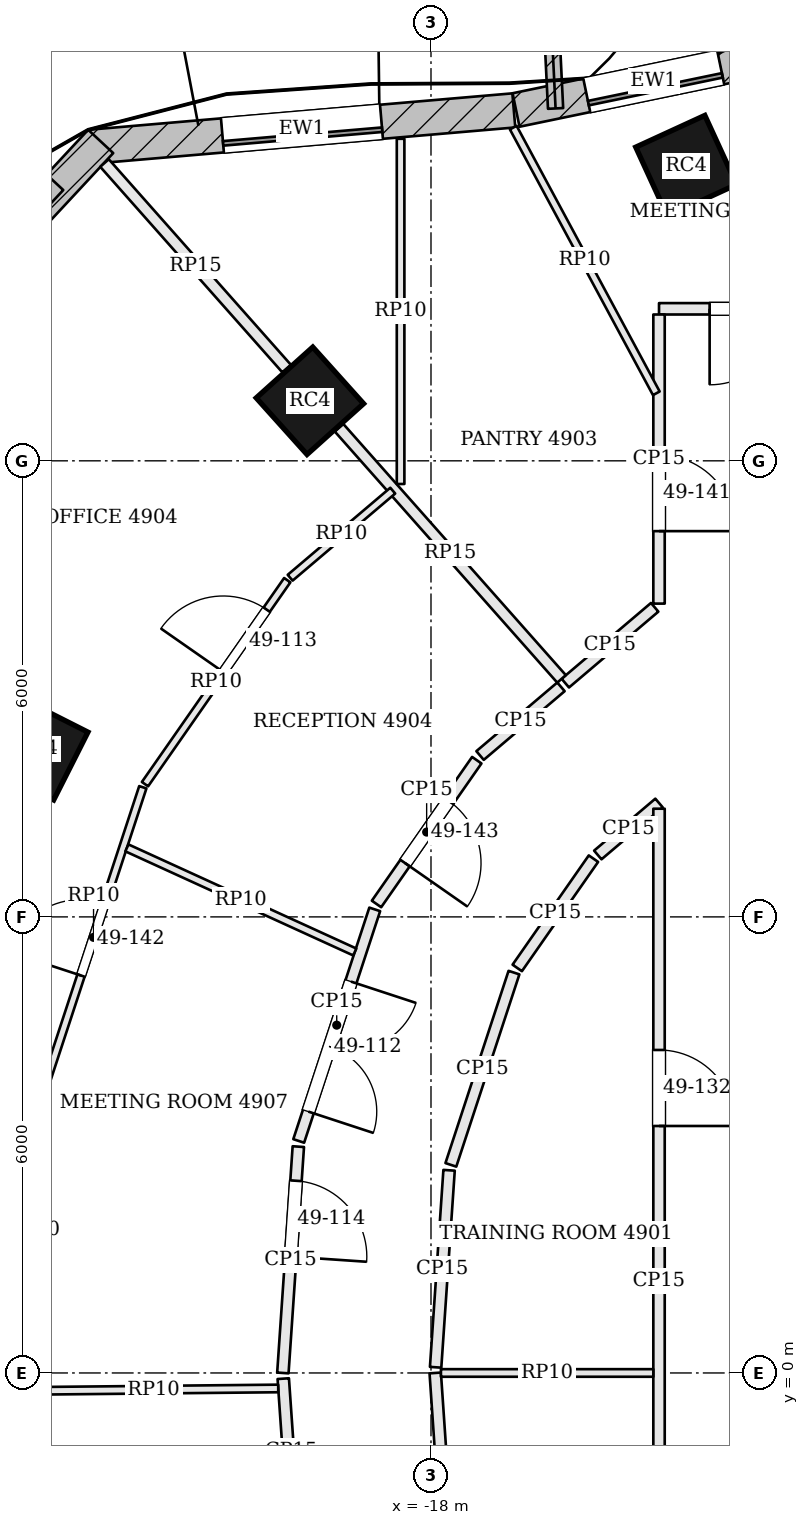
"""IFC4 building model, lengths in metres.
Left out: names, types, materials, properties, quantities, classifications, styles, units other than length and angle.
Written with IfcOpenShell. Run it as: python <this file> out.ifc"""

import sys

from ifc_helpers import new_model, si_unit, direction, frame, frame_2d, origin, origin_2d, place, context, subcontext, project, spatial, rectangle, extrude, element, fill, save


model = new_model("IFC4")
c1 = context("Model", 3, precision=1e-05, world=origin(), true_north=direction((0.0, 1.0)))
c2 = subcontext(c1, "Body", "Model", "MODEL_VIEW")
j1 = project(units=[si_unit("LENGTHUNIT", "METRE"), si_unit("PLANEANGLEUNIT", "RADIAN")], contexts=[c1])
p1 = place(None, origin())
s1 = spatial("IfcSite", under=j1, at=p1, CompositionType="ELEMENT")
p2 = place(p1, origin())
s2 = spatial("IfcBuilding", under=s1, at=p2, CompositionType="ELEMENT")
p3 = place(p2, frame((0.0, 0.0, 201.3)))
s3 = spatial("IfcBuildingStorey", under=s2, at=p3, CompositionType="ELEMENT", Elevation=201.3)
for number, where, z_axis, x_axis in (
    (1, (-14.643, 15.881, 0.0), (0.0, 0.0, 1.0), (-0.909, -0.417, 0.0)),
    (2, (-19.593, 12.79, 0.0), (0.0, 0.0, 1.0), (-0.744, -0.668, 0.0)),
    (3, (-23.185, 8.21, 0.0), (0.0, 0.0, 1.0), (-0.451, -0.893, 0.0)),
):
    element("IfcColumn", number, at=place(p3, frame(where, z_axis=z_axis, x_axis=x_axis)), inside=s3, PredefinedType="COLUMN", context=c2, shape_type="SweptSolid", body=[
        extrude(rectangle(XDim=1.0, YDim=1.0, at=origin_2d()), origin(), (0.0, 0.0, 1.0), 3.9),
    ])
p4 = place(p3, frame((-13.258, 17.367, 0.0), z_axis=(0.0, 0.0, 1.0), x_axis=(-0.97914968674, -0.203140077183, 0.0)))
e4 = element("IfcWall", 4, at=p4, inside=s3, PredefinedType="SOLIDWALL", context=c2, shape_type="SweptSolid", body=[
    extrude(rectangle(XDim=3.7, YDim=0.45, at=frame_2d((1.85, 0.0))), origin(), (0.0, 0.0, 1.0), 3.7),
])
p5 = place(p4, frame((0.95, 0.0, 0.9)))
e5 = element("IfcOpeningElement", 5, at=p5, cuts=e4, PredefinedType="OPENING", context=c2, shape_type="SweptSolid", body=[
    extrude(rectangle(XDim=1.8, YDim=2.3, at=frame_2d((0.9, 1.15))), frame((0.0, 0.235, 0.0), z_axis=(0.0, -1.0, 0.0), x_axis=(1.0, 0.0, 0.0)), (0.0, 0.0, 1.0), 0.47),
])
p6 = place(p3, frame((-16.91, 16.61, 0.0), z_axis=(0.0, 0.0, 1.0), x_axis=(-0.996333165816, -0.085558299972, 0.0)))
e6 = element("IfcWall", 6, at=p6, inside=s3, PredefinedType="SOLIDWALL", context=c2, shape_type="SweptSolid", body=[
    extrude(rectangle(XDim=5.596, YDim=0.45, at=frame_2d((2.798, 0.0))), origin(), (0.0, 0.0, 1.0), 3.7),
])
p7 = place(p6, frame((1.748, 0.0, 0.9)))
e7 = element("IfcOpeningElement", 7, at=p7, cuts=e6, PredefinedType="OPENING", context=c2, shape_type="SweptSolid", body=[
    extrude(rectangle(XDim=2.1, YDim=2.3, at=frame_2d((1.05, 1.15))), frame((0.0, 0.235, 0.0), z_axis=(0.0, -1.0, 0.0), x_axis=(1.0, 0.0, 0.0)), (0.0, 0.0, 1.0), 0.47),
])
p8 = place(p3, frame((-22.345, 16.202, 0.0), z_axis=(0.0, 0.0, 1.0), x_axis=(-0.681249161265, -0.732051624051, 0.0)))
e8 = element("IfcWall", 8, at=p8, inside=s3, PredefinedType="SOLIDWALL", context=c2, shape_type="SweptSolid", body=[
    extrude(rectangle(XDim=4.527, YDim=0.45, at=frame_2d((2.263, 0.0))), origin(), (0.0, 0.0, 1.0), 3.7),
])
p9 = place(p8, frame((1.213, 0.0, 0.9)))
e9 = element("IfcOpeningElement", 9, at=p9, cuts=e8, PredefinedType="OPENING", context=c2, shape_type="SweptSolid", body=[
    extrude(rectangle(XDim=2.1, YDim=2.3, at=frame_2d((1.05, 1.15))), frame((0.0, 0.235, 0.0), z_axis=(0.0, -1.0, 0.0), x_axis=(1.0, 0.0, 0.0)), (0.0, 0.0, 1.0), 0.47),
])
p10 = place(p3, frame((-16.361, 16.636, 0.0), z_axis=(0.0, 0.0, 1.0), x_axis=(-0.048552811097, 0.998820616795, 0.0)))
e10 = element("IfcWall", 10, at=p10, inside=s3, PredefinedType="SOLIDWALL", context=c2, shape_type="SweptSolid", body=[
    extrude(rectangle(XDim=1.75, YDim=0.2, at=frame_2d((0.875, 0.0))), origin(), (0.0, 0.0, 1.0), 3.7),
])
p11 = place(p3, frame((-22.948, 15.665, 3.9), z_axis=(0.0, 0.0, 1.0), x_axis=(-0.681269800001, -0.732032417046, 0.0)))
e11 = element("IfcWall", 11, at=p11, inside=s3, PredefinedType="PARAPET", context=c2, shape_type="SweptSolid", body=[
    extrude(rectangle(XDim=3.578, YDim=0.3, at=frame_2d((1.789, 0.0))), origin(), (0.0, 0.0, 1.0), 1.1),
])
p12 = place(p3, frame((-3.313, 14.0, 0.0), z_axis=(0.0, 0.0, 1.0), x_axis=(-1.0, 0.0, 0.0)))
e12 = element("IfcWall", 12, at=p12, inside=s3, PredefinedType="PARTITIONING", context=c2, shape_type="SweptSolid", body=[
    extrude(rectangle(XDim=11.687, YDim=0.15, at=frame_2d((5.843, 0.0))), origin(), (0.0, 0.0, 1.0), 3.084),
])
p13 = place(p12, frame((1.77, 0.0, 0.0)))
e13 = element("IfcOpeningElement", 13, at=p13, cuts=e12, PredefinedType="OPENING", context=c2, shape_type="SweptSolid", body=[
    extrude(rectangle(XDim=1.8, YDim=2.1, at=frame_2d((0.9, 1.05))), frame((0.0, 0.085, 0.0), z_axis=(0.0, -1.0, 0.0), x_axis=(1.0, 0.0, 0.0)), (0.0, 0.0, 1.0), 0.17),
])
p14 = place(p12, frame((6.297, 0.0, 0.0)))
e14 = element("IfcOpeningElement", 14, at=p14, cuts=e12, PredefinedType="OPENING", context=c2, shape_type="SweptSolid", body=[
    extrude(rectangle(XDim=1.0, YDim=2.4, at=frame_2d((0.5, 1.2))), frame((0.0, 0.085, 0.0), z_axis=(0.0, -1.0, 0.0), x_axis=(1.0, 0.0, 0.0)), (0.0, 0.0, 1.0), 0.17),
])
p15 = place(p12, frame((10.021, 0.0, 0.0)))
e15 = element("IfcOpeningElement", 15, at=p15, cuts=e12, PredefinedType="OPENING", context=c2, shape_type="SweptSolid", body=[
    extrude(rectangle(XDim=1.0, YDim=2.4, at=frame_2d((0.5, 1.2))), frame((0.0, 0.085, 0.0), z_axis=(0.0, -1.0, 0.0), x_axis=(1.0, 0.0, 0.0)), (0.0, 0.0, 1.0), 0.17),
])
p16 = place(p3, frame((-15.0, 13.925, 0.0), z_axis=(0.0, 0.0, 1.0), x_axis=(0.0, -1.0, 0.0)))
e16 = element("IfcWall", 16, at=p16, inside=s3, PredefinedType="PARTITIONING", context=c2, shape_type="SweptSolid", body=[
    extrude(rectangle(XDim=3.803, YDim=0.15, at=frame_2d((1.902, 0.0))), origin(), (0.0, 0.0, 1.0), 3.084),
])
p17 = place(p16, frame((1.85, 0.0, 0.0)))
e17 = element("IfcOpeningElement", 17, at=p17, cuts=e16, PredefinedType="OPENING", context=c2, shape_type="SweptSolid", body=[
    extrude(rectangle(XDim=1.0, YDim=2.1, at=frame_2d((0.5, 1.05))), frame((0.0, 0.085, 0.0), z_axis=(0.0, -1.0, 0.0), x_axis=(1.0, 0.0, 0.0)), (0.0, 0.0, 1.0), 0.17),
])
p18 = place(p3, frame((-15.057, 10.073, 0.0), z_axis=(0.0, 0.0, 1.0), x_axis=(-0.762454697996, -0.647041601061, 0.0)))
e18 = element("IfcWall", 18, at=p18, inside=s3, PredefinedType="PARTITIONING", context=c2, shape_type="SweptSolid", body=[
    extrude(rectangle(XDim=1.542, YDim=0.15, at=frame_2d((0.771, 0.0))), origin(), (0.0, 0.0, 1.0), 3.084),
])
p19 = place(p3, frame((-22.295, 15.918, 0.0), z_axis=(0.0, 0.0, 1.0), x_axis=(0.663108813626, -0.748523013201, 0.0)))
e19 = element("IfcWall", 19, at=p19, inside=s3, PredefinedType="PARTITIONING", context=c2, shape_type="SweptSolid", body=[
    extrude(rectangle(XDim=3.613, YDim=0.15, at=frame_2d((1.806, 0.0))), origin(), (0.0, 0.0, 1.0), 3.084),
])
p20 = place(p3, frame((-19.21, 12.435, 0.0), z_axis=(0.0, 0.0, 1.0), x_axis=(0.663120249496, -0.748512882125, 0.0)))
e20 = element("IfcWall", 20, at=p20, inside=s3, PredefinedType="PARTITIONING", context=c2, shape_type="SweptSolid", body=[
    extrude(rectangle(XDim=4.414, YDim=0.15, at=frame_2d((2.207, 0.0))), origin(), (0.0, 0.0, 1.0), 3.084),
])
p21 = place(p3, frame((-16.29, 9.027, 0.0), z_axis=(0.0, 0.0, 1.0), x_axis=(-0.762370577706, -0.647140712865, 0.0)))
e21 = element("IfcWall", 21, at=p21, inside=s3, PredefinedType="PARTITIONING", context=c2, shape_type="SweptSolid", body=[
    extrude(rectangle(XDim=1.396, YDim=0.15, at=frame_2d((0.698, 0.0))), origin(), (0.0, 0.0, 1.0), 3.084),
])
p22 = place(p3, frame((-17.397, 8.062, 0.0), z_axis=(0.0, 0.0, 1.0), x_axis=(-0.572118665737, -0.820170855563, 0.0)))
e22 = element("IfcWall", 22, at=p22, inside=s3, PredefinedType="PARTITIONING", context=c2, shape_type="SweptSolid", body=[
    extrude(rectangle(XDim=2.306, YDim=0.15, at=frame_2d((1.153, 0.0))), origin(), (0.0, 0.0, 1.0), 3.084),
])
p23 = place(p22, frame((0.65, 0.0, 0.0)))
e23 = element("IfcOpeningElement", 23, at=p23, cuts=e22, PredefinedType="OPENING", context=c2, shape_type="SweptSolid", body=[
    extrude(rectangle(XDim=1.0, YDim=2.1, at=frame_2d((0.5, 1.05))), frame((0.0, 0.085, 0.0), z_axis=(0.0, -1.0, 0.0), x_axis=(1.0, 0.0, 0.0)), (0.0, 0.0, 1.0), 0.17),
])
p24 = place(p3, frame((-18.74, 6.099, 0.0), z_axis=(0.0, 0.0, 1.0), x_axis=(-0.31188427026, -0.950120098706, 0.0)))
e24 = element("IfcWall", 24, at=p24, inside=s3, PredefinedType="PARTITIONING", context=c2, shape_type="SweptSolid", body=[
    extrude(rectangle(XDim=3.206, YDim=0.15, at=frame_2d((1.603, 0.0))), origin(), (0.0, 0.0, 1.0), 3.084),
])
p25 = place(p24, frame((1.0, 0.0, 0.0)))
e25 = element("IfcOpeningElement", 25, at=p25, cuts=e24, PredefinedType="OPENING", context=c2, shape_type="SweptSolid", body=[
    extrude(rectangle(XDim=1.8, YDim=2.1, at=frame_2d((0.9, 1.05))), frame((0.0, 0.085, 0.0), z_axis=(0.0, -1.0, 0.0), x_axis=(1.0, 0.0, 0.0)), (0.0, 0.0, 1.0), 0.17),
])
p26 = place(p3, frame((-19.745, 2.978, 0.0), z_axis=(0.0, 0.0, 1.0), x_axis=(-0.068142324, -0.997675610447, 0.0)))
e26 = element("IfcWall", 26, at=p26, inside=s3, PredefinedType="PARTITIONING", context=c2, shape_type="SweptSolid", body=[
    extrude(rectangle(XDim=2.984, YDim=0.15, at=frame_2d((1.492, 0.0))), origin(), (0.0, 0.0, 1.0), 3.084),
])
p27 = place(p26, frame((0.45, 0.0, 0.0)))
e27 = element("IfcOpeningElement", 27, at=p27, cuts=e26, PredefinedType="OPENING", context=c2, shape_type="SweptSolid", body=[
    extrude(rectangle(XDim=1.0, YDim=2.4, at=frame_2d((0.5, 1.2))), frame((0.0, 0.085, 0.0), z_axis=(0.0, -1.0, 0.0), x_axis=(1.0, 0.0, 0.0)), (0.0, 0.0, 1.0), 0.17),
])
p28 = place(p3, frame((-19.944, -0.075, 0.0), z_axis=(0.0, 0.0, 1.0), x_axis=(0.069483400546, -0.99758310784, 0.0)))
e28 = element("IfcWall", 28, at=p28, inside=s3, PredefinedType="PARTITIONING", context=c2, shape_type="SweptSolid", body=[
    extrude(rectangle(XDim=3.001, YDim=0.15, at=frame_2d((1.5, 0.0))), origin(), (0.0, 0.0, 1.0), 3.084),
])
p29 = place(p28, frame((1.05, 0.0, 0.0)))
e29 = element("IfcOpeningElement", 29, at=p29, cuts=e28, PredefinedType="OPENING", context=c2, shape_type="SweptSolid", body=[
    extrude(rectangle(XDim=0.9, YDim=2.1, at=frame_2d((0.45, 1.05))), frame((0.0, 0.085, 0.0), z_axis=(0.0, -1.0, 0.0), x_axis=(1.0, 0.0, 0.0)), (0.0, 0.0, 1.0), 0.17),
])
p30 = place(p3, frame((-17.767, -2.592, 0.0), z_axis=(0.0, 0.0, 1.0), x_axis=(-0.068140828228, 0.997675712608, 0.0)))
e30 = element("IfcWall", 30, at=p30, inside=s3, PredefinedType="PARTITIONING", context=c2, shape_type="SweptSolid", body=[
    extrude(rectangle(XDim=2.598, YDim=0.15, at=frame_2d((1.299, 0.0))), origin(), (0.0, 0.0, 1.0), 3.084),
])
p31 = place(p3, frame((-17.939, 0.075, 0.0), z_axis=(0.0, 0.0, 1.0), x_axis=(0.068227980697, 0.997669756307, 0.0)))
e31 = element("IfcWall", 31, at=p31, inside=s3, PredefinedType="PARTITIONING", context=c2, shape_type="SweptSolid", body=[
    extrude(rectangle(XDim=2.598, YDim=0.15, at=frame_2d((1.299, 0.0))), origin(), (0.0, 0.0, 1.0), 3.084),
])
p32 = place(p3, frame((-17.739, 2.738, 0.0), z_axis=(0.0, 0.0, 1.0), x_axis=(0.311904957484, 0.950113307715, 0.0)))
e32 = element("IfcWall", 32, at=p32, inside=s3, PredefinedType="PARTITIONING", context=c2, shape_type="SweptSolid", body=[
    extrude(rectangle(XDim=2.662, YDim=0.15, at=frame_2d((1.331, 0.0))), origin(), (0.0, 0.0, 1.0), 3.084),
])
p33 = place(p3, frame((-16.865, 5.329, 0.0), z_axis=(0.0, 0.0, 1.0), x_axis=(0.572096615639, 0.820186236397, 0.0)))
e33 = element("IfcWall", 33, at=p33, inside=s3, PredefinedType="PARTITIONING", context=c2, shape_type="SweptSolid", body=[
    extrude(rectangle(XDim=1.753, YDim=0.15, at=frame_2d((0.876, 0.0))), origin(), (0.0, 0.0, 1.0), 3.084),
])
p34 = place(p3, frame((-15.805, 6.814, 0.0), z_axis=(0.0, 0.0, 1.0), x_axis=(0.762298381233, 0.647225755027, 0.0)))
e34 = element("IfcWall", 34, at=p34, inside=s3, PredefinedType="PARTITIONING", context=c2, shape_type="SweptSolid", body=[
    extrude(rectangle(XDim=1.057, YDim=0.15, at=frame_2d((0.528, 0.0))), origin(), (0.0, 0.0, 1.0), 3.084),
])
p35 = place(p3, frame((-15.0, 7.423, 0.0), z_axis=(0.0, 0.0, 1.0), x_axis=(0.0, -1.0, 0.0)))
e35 = element("IfcWall", 35, at=p35, inside=s3, PredefinedType="PARTITIONING", context=c2, shape_type="SweptSolid", body=[
    extrude(rectangle(XDim=12.423, YDim=0.15, at=frame_2d((6.211, 0.0))), origin(), (0.0, 0.0, 1.0), 3.084),
])
p36 = place(p35, frame((3.174, 0.0, 0.0)))
e36 = element("IfcOpeningElement", 36, at=p36, cuts=e35, PredefinedType="OPENING", context=c2, shape_type="SweptSolid", body=[
    extrude(rectangle(XDim=1.0, YDim=2.1, at=frame_2d((0.5, 1.05))), frame((0.0, 0.085, 0.0), z_axis=(0.0, -1.0, 0.0), x_axis=(1.0, 0.0, 0.0)), (0.0, 0.0, 1.0), 0.17),
])
p37 = place(p3, frame((-18.4, 11.695, 0.0), z_axis=(0.0, 0.0, 1.0), x_axis=(0.0, 1.0, 0.0)))
e37 = element("IfcWall", 37, at=p37, inside=s3, PredefinedType="PARTITIONING", context=c2, shape_type="SweptSolid", body=[
    extrude(rectangle(XDim=4.541, YDim=0.1, at=frame_2d((2.271, 0.0))), origin(), (0.0, 0.0, 1.0), 3.084),
])
p38 = place(p3, frame((-15.036, 12.888, 0.0), z_axis=(0.0, 0.0, 1.0), x_axis=(-0.474066818375, 0.880488870864, 0.0)))
e38 = element("IfcWall", 38, at=p38, inside=s3, PredefinedType="PARTITIONING", context=c2, shape_type="SweptSolid", body=[
    extrude(rectangle(XDim=3.97, YDim=0.1, at=frame_2d((1.985, 0.0))), origin(), (0.0, 0.0, 1.0), 3.084),
])
p39 = place(p3, frame((-23.088, 3.756, 0.0), z_axis=(0.0, 0.0, 1.0), x_axis=(0.311942747624, 0.950100901065, 0.0)))
e39 = element("IfcWall", 39, at=p39, inside=s3, PredefinedType="PARTITIONING", context=c2, shape_type="SweptSolid", body=[
    extrude(rectangle(XDim=4.157, YDim=0.1, at=frame_2d((2.078, 0.0))), origin(), (0.0, 0.0, 1.0), 3.084),
])
p40 = place(p39, frame((1.55, 0.0, 0.0)))
e40 = element("IfcOpeningElement", 40, at=p40, cuts=e39, PredefinedType="OPENING", context=c2, shape_type="SweptSolid", body=[
    extrude(rectangle(XDim=1.0, YDim=2.4, at=frame_2d((0.5, 1.2))), frame((0.0, 0.06, 0.0), z_axis=(0.0, -1.0, 0.0), x_axis=(1.0, 0.0, 0.0)), (0.0, 0.0, 1.0), 0.12),
])
p41 = place(p3, frame((-21.763, 7.746, 0.0), z_axis=(0.0, 0.0, 1.0), x_axis=(0.57207420081, 0.820201870741, 0.0)))
e41 = element("IfcWall", 41, at=p41, inside=s3, PredefinedType="PARTITIONING", context=c2, shape_type="SweptSolid", body=[
    extrude(rectangle(XDim=3.271, YDim=0.1, at=frame_2d((1.636, 0.0))), origin(), (0.0, 0.0, 1.0), 3.084),
])
p42 = place(p41, frame((1.799, 0.0, 0.0)))
e42 = element("IfcOpeningElement", 42, at=p42, cuts=e41, PredefinedType="OPENING", context=c2, shape_type="SweptSolid", body=[
    extrude(rectangle(XDim=1.0, YDim=2.1, at=frame_2d((0.5, 1.05))), frame((0.0, 0.06, 0.0), z_axis=(0.0, -1.0, 0.0), x_axis=(1.0, 0.0, 0.0)), (0.0, 0.0, 1.0), 0.12),
])
p43 = place(p3, frame((-19.853, 10.462, 0.0), z_axis=(0.0, 0.0, 1.0), x_axis=(0.762401913856, 0.64710379519, 0.0)))
e43 = element("IfcWall", 43, at=p43, inside=s3, PredefinedType="PARTITIONING", context=c2, shape_type="SweptSolid", body=[
    extrude(rectangle(XDim=1.77, YDim=0.1, at=frame_2d((0.885, 0.0))), origin(), (0.0, 0.0, 1.0), 3.084),
])
p44 = place(p3, frame((-19.003, 5.538, 0.0), z_axis=(0.0, 0.0, 1.0), x_axis=(-0.909578475077, 0.41553218609, 0.0)))
e44 = element("IfcWall", 44, at=p44, inside=s3, PredefinedType="PARTITIONING", context=c2, shape_type="SweptSolid", body=[
    extrude(rectangle(XDim=3.296, YDim=0.1, at=frame_2d((1.648, 0.0))), origin(), (0.0, 0.0, 1.0), 3.084),
])
p45 = place(p3, frame((-20.01, -0.204, 0.0), z_axis=(0.0, 0.0, 1.0), x_axis=(-0.999952479937, -0.009748736688, 0.0)))
e45 = element("IfcWall", 45, at=p45, inside=s3, PredefinedType="PARTITIONING", context=c2, shape_type="SweptSolid", body=[
    extrude(rectangle(XDim=3.281, YDim=0.1, at=frame_2d((1.64, 0.0))), origin(), (0.0, 0.0, 1.0), 3.084),
])
p46 = place(p3, frame((-17.869, 0.0, 0.0), z_axis=(0.0, 0.0, 1.0), x_axis=(1.0, 0.0, 0.0)))
e46 = element("IfcWall", 46, at=p46, inside=s3, PredefinedType="PARTITIONING", context=c2, shape_type="SweptSolid", body=[
    extrude(rectangle(XDim=2.794, YDim=0.1, at=frame_2d((1.397, 0.0))), origin(), (0.0, 0.0, 1.0), 3.084),
])
p47 = place(p5, origin())
e47 = element("IfcWindow", 47, at=p47, inside=s3, PartitioningType="SINGLE_PANEL", PredefinedType="WINDOW", context=c2, shape_type="SweptSolid", body=[
    extrude(rectangle(XDim=1.8, YDim=2.3, at=frame_2d((0.9, 1.15))), frame((0.0, 0.135, 0.0), z_axis=(0.0, -1.0, 0.0), x_axis=(1.0, 0.0, 0.0)), (0.0, 0.0, 1.0), 0.06),
])
fill(e5, e47)
p48 = place(p7, origin())
e48 = element("IfcWindow", 48, at=p48, inside=s3, PartitioningType="SINGLE_PANEL", PredefinedType="WINDOW", context=c2, shape_type="SweptSolid", body=[
    extrude(rectangle(XDim=2.1, YDim=2.3, at=frame_2d((1.05, 1.15))), frame((0.0, 0.135, 0.0), z_axis=(0.0, -1.0, 0.0), x_axis=(1.0, 0.0, 0.0)), (0.0, 0.0, 1.0), 0.06),
])
fill(e7, e48)
p49 = place(p15, origin())
e49 = element("IfcDoor", 49, at=p49, inside=s3, OperationType="SINGLE_SWING_RIGHT", PredefinedType="DOOR", context=c2, shape_type="SweptSolid", body=[
    extrude(rectangle(XDim=1.0, YDim=2.4, at=frame_2d((0.5, 1.2))), frame((0.0, 0.025, 0.0), z_axis=(0.0, -1.0, 0.0), x_axis=(1.0, 0.0, 0.0)), (0.0, 0.0, 1.0), 0.05),
])
fill(e15, e49)
p50 = place(p25, origin())
e50 = element("IfcDoor", 50, at=p50, inside=s3, OperationType="DOUBLE_DOOR_SINGLE_SWING", PredefinedType="DOOR", context=c2, shape_type="SweptSolid", body=[
    extrude(rectangle(XDim=1.8, YDim=2.1, at=frame_2d((0.9, 1.05))), frame((0.0, 0.025, 0.0), z_axis=(0.0, -1.0, 0.0), x_axis=(1.0, 0.0, 0.0)), (0.0, 0.0, 1.0), 0.05),
])
fill(e25, e50)
p51 = place(p42, origin())
e51 = element("IfcDoor", 51, at=p51, inside=s3, OperationType="SINGLE_SWING_LEFT", PredefinedType="DOOR", context=c2, shape_type="SweptSolid", body=[
    extrude(rectangle(XDim=1.0, YDim=2.1, at=frame_2d((0.5, 1.05))), frame((0.0, 0.025, 0.0), z_axis=(0.0, -1.0, 0.0), x_axis=(1.0, 0.0, 0.0)), (0.0, 0.0, 1.0), 0.05),
])
fill(e42, e51)
p52 = place(p27, origin())
e52 = element("IfcDoor", 52, at=p52, inside=s3, OperationType="SINGLE_SWING_RIGHT", PredefinedType="DOOR", context=c2, shape_type="SweptSolid", body=[
    extrude(rectangle(XDim=1.0, YDim=2.4, at=frame_2d((0.5, 1.2))), frame((0.0, 0.025, 0.0), z_axis=(0.0, -1.0, 0.0), x_axis=(1.0, 0.0, 0.0)), (0.0, 0.0, 1.0), 0.05),
])
fill(e27, e52)
p53 = place(p36, origin())
e53 = element("IfcDoor", 53, at=p53, inside=s3, OperationType="SINGLE_SWING_RIGHT", PredefinedType="DOOR", context=c2, shape_type="SweptSolid", body=[
    extrude(rectangle(XDim=1.0, YDim=2.1, at=frame_2d((0.5, 1.05))), frame((0.0, 0.025, 0.0), z_axis=(0.0, -1.0, 0.0), x_axis=(1.0, 0.0, 0.0)), (0.0, 0.0, 1.0), 0.05),
])
fill(e36, e53)
p54 = place(p17, origin())
e54 = element("IfcDoor", 54, at=p54, inside=s3, OperationType="SINGLE_SWING_RIGHT", PredefinedType="DOOR", context=c2, shape_type="SweptSolid", body=[
    extrude(rectangle(XDim=1.0, YDim=2.1, at=frame_2d((0.5, 1.05))), frame((0.0, 0.025, 0.0), z_axis=(0.0, -1.0, 0.0), x_axis=(1.0, 0.0, 0.0)), (0.0, 0.0, 1.0), 0.05),
])
fill(e17, e54)
p55 = place(p40, origin())
e55 = element("IfcDoor", 55, at=p55, inside=s3, OperationType="SINGLE_SWING_LEFT", PredefinedType="DOOR", context=c2, shape_type="SweptSolid", body=[
    extrude(rectangle(XDim=1.0, YDim=2.4, at=frame_2d((0.5, 1.2))), frame((0.0, 0.025, 0.0), z_axis=(0.0, -1.0, 0.0), x_axis=(1.0, 0.0, 0.0)), (0.0, 0.0, 1.0), 0.05),
])
fill(e40, e55)
p56 = place(p23, origin())
e56 = element("IfcDoor", 56, at=p56, inside=s3, OperationType="SINGLE_SWING_RIGHT", PredefinedType="DOOR", context=c2, shape_type="SweptSolid", body=[
    extrude(rectangle(XDim=1.0, YDim=2.1, at=frame_2d((0.5, 1.05))), frame((0.0, 0.025, 0.0), z_axis=(0.0, -1.0, 0.0), x_axis=(1.0, 0.0, 0.0)), (0.0, 0.0, 1.0), 0.05),
])
fill(e23, e56)
save(model, sys.argv[1])
